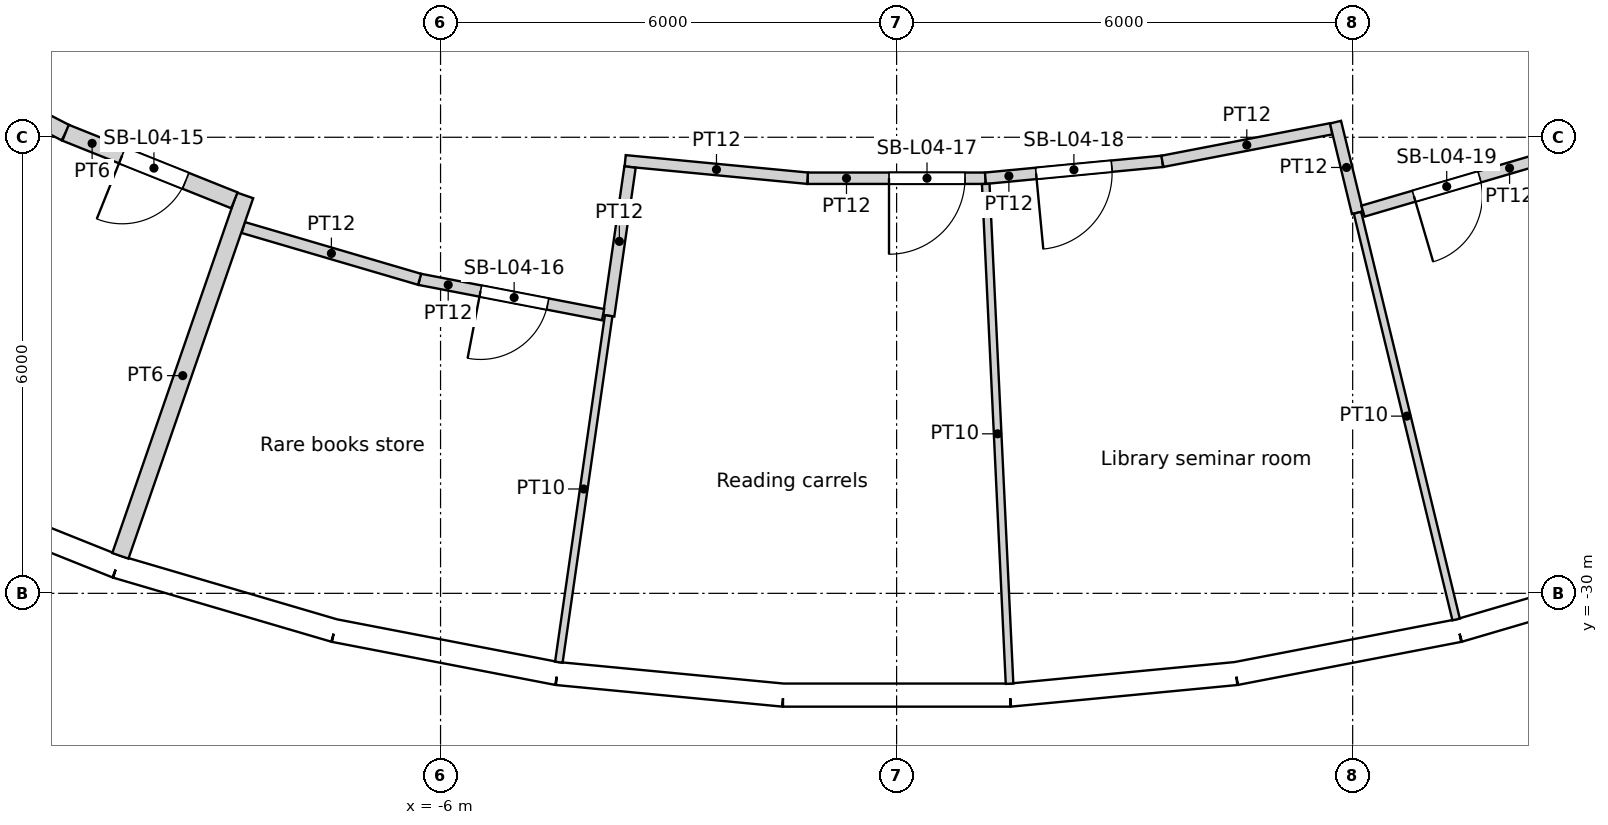
"""IFC4 building model, lengths in metres.
Left out: names, types, materials, properties, quantities, classifications, styles, units other than length and angle.
Written with IfcOpenShell. Run it as: python <this file> out.ifc"""

import sys

from ifc_helpers import new_model, si_unit, direction, frame, frame_2d, origin, origin_2d, place, context, subcontext, project, spatial, rectangle, circle, extrude, element, fill, save


model = new_model("IFC4")
c1 = context("Model", 3, precision=1e-05, world=origin(), true_north=direction((0.0, 1.0)))
c2 = subcontext(c1, "Body", "Model", "MODEL_VIEW")
j1 = project(units=[si_unit("LENGTHUNIT", "METRE"), si_unit("PLANEANGLEUNIT", "RADIAN")], contexts=[c1])
p1 = place(None, origin())
s1 = spatial("IfcSite", under=j1, at=p1, CompositionType="ELEMENT")
p2 = place(p1, origin())
s2 = spatial("IfcBuilding", under=s1, at=p2, CompositionType="ELEMENT")
p3 = place(p2, frame((0.0, 0.0, 23.4)))
s3 = spatial("IfcBuildingStorey", under=s2, at=p3, CompositionType="ELEMENT", Elevation=23.4)
for number, where, z_axis, x_axis in (
    (1, (-9.902, -28.61, 0.0), (0.0, 0.0, 1.0), (1.0, 0.0, 0.0)),
    (2, (-4.309, -29.966, 0.0), (0.0, 0.0, 1.0), (1.0, 0.0, 0.0)),
    (3, (1.44, -30.24, 0.0), (0.0, 0.0, 1.0), (1.0, 0.0, 0.0)),
    (4, (7.137, -29.421, 0.0), (0.0, 0.0, 1.0), (1.0, 0.0, 0.0)),
):
    element("IfcColumn", number, at=place(p3, frame(where, z_axis=z_axis, x_axis=x_axis)), inside=s3, PredefinedType="COLUMN", context=c2, shape_type="SweptSolid", body=[
        extrude(circle(Radius=0.7, at=origin_2d()), origin(), (0.0, 0.0, 1.0), 4.8),
    ])
for number, where, z_axis, x_axis in (
    (5, (-7.04, -23.516, 0.0), (0.0, 0.0, 1.0), (1.0, 0.0, 0.0)),
    (6, (-1.427, -24.506, 0.0), (0.0, 0.0, 1.0), (1.0, 0.0, 0.0)),
    (7, (4.263, -24.175, 0.0), (0.0, 0.0, 1.0), (1.0, 0.0, 0.0)),
):
    element("IfcColumn", number, at=place(p3, frame(where, z_axis=z_axis, x_axis=x_axis)), inside=s3, PredefinedType="COLUMN", context=c2, shape_type="SweptSolid", body=[
        extrude(circle(Radius=0.75, at=origin_2d()), origin(), (0.0, 0.0, 1.0), 4.8),
    ])
p4 = place(p3, frame((-13.033, -28.539, 0.0), z_axis=(0.0, 0.0, 1.0), x_axis=(0.928380795373, -0.371630325434, 0.0)))
e8 = element("IfcWall", 8, at=p4, inside=s3, PredefinedType="SOLIDWALL", context=c2, shape_type="SweptSolid", body=[
    extrude(rectangle(XDim=2.986, YDim=0.3, at=frame_2d((1.493, 0.0))), origin(), (0.0, 0.0, 1.0), 3.85),
])
p5 = place(p4, frame((1.493, 0.0, 2.0)))
e9 = element("IfcOpeningElement", 9, at=p5, cuts=e8, PredefinedType="OPENING", context=c2, shape_type="SweptSolid", body=[
    extrude(circle(Radius=1.2, at=origin_2d()), frame((0.0, 0.16, 0.0), z_axis=(0.0, -1.0, 0.0), x_axis=(1.0, 0.0, 0.0)), (0.0, 0.0, 1.0), 0.32),
])
p6 = place(p3, frame((-10.261, -29.649, 0.0), z_axis=(0.0, 0.0, 1.0), x_axis=(0.959502108153, -0.281701445593, 0.0)))
e10 = element("IfcWall", 10, at=p6, inside=s3, PredefinedType="SOLIDWALL", context=c2, shape_type="SweptSolid", body=[
    extrude(rectangle(XDim=2.986, YDim=0.3, at=frame_2d((1.493, 0.0))), origin(), (0.0, 0.0, 1.0), 4.35),
])
p7 = place(p6, frame((1.493, 0.0, 2.0)))
e11 = element("IfcOpeningElement", 11, at=p7, cuts=e10, PredefinedType="OPENING", context=c2, shape_type="SweptSolid", body=[
    extrude(circle(Radius=1.2, at=origin_2d()), frame((0.0, 0.16, 0.0), z_axis=(0.0, -1.0, 0.0), x_axis=(1.0, 0.0, 0.0)), (0.0, 0.0, 1.0), 0.32),
])
p8 = place(p3, frame((-7.397, -30.49, 0.0), z_axis=(0.0, 0.0, 1.0), x_axis=(0.981918853666, -0.189302310646, 0.0)))
e12 = element("IfcWall", 12, at=p8, inside=s3, PredefinedType="SOLIDWALL", context=c2, shape_type="SweptSolid", body=[
    extrude(rectangle(XDim=2.986, YDim=0.3, at=frame_2d((1.493, 0.0))), origin(), (0.0, 0.0, 1.0), 4.35),
])
p9 = place(p8, frame((1.493, 0.0, 2.0)))
e13 = element("IfcOpeningElement", 13, at=p9, cuts=e12, PredefinedType="OPENING", context=c2, shape_type="SweptSolid", body=[
    extrude(circle(Radius=1.2, at=origin_2d()), frame((0.0, 0.16, 0.0), z_axis=(0.0, -1.0, 0.0), x_axis=(1.0, 0.0, 0.0)), (0.0, 0.0, 1.0), 0.32),
])
p10 = place(p3, frame((-4.465, -31.055, 0.0), z_axis=(0.0, 0.0, 1.0), x_axis=(0.99547560533, -0.095017467833, 0.0)))
e14 = element("IfcWall", 14, at=p10, inside=s3, PredefinedType="SOLIDWALL", context=c2, shape_type="SweptSolid", body=[
    extrude(rectangle(XDim=2.986, YDim=0.3, at=frame_2d((1.493, 0.0))), origin(), (0.0, 0.0, 1.0), 3.85),
])
p11 = place(p10, frame((1.493, 0.0, 2.0)))
e15 = element("IfcOpeningElement", 15, at=p11, cuts=e14, PredefinedType="OPENING", context=c2, shape_type="SweptSolid", body=[
    extrude(circle(Radius=1.2, at=origin_2d()), frame((0.0, 0.16, 0.0), z_axis=(0.0, -1.0, 0.0), x_axis=(1.0, 0.0, 0.0)), (0.0, 0.0, 1.0), 0.32),
])
p12 = place(p3, frame((-1.493, -31.339, 0.0), z_axis=(0.0, 0.0, 1.0), x_axis=(1.0, 0.0, 0.0)))
e16 = element("IfcWall", 16, at=p12, inside=s3, PredefinedType="SOLIDWALL", context=c2, shape_type="SweptSolid", body=[
    extrude(rectangle(XDim=2.986, YDim=0.3, at=frame_2d((1.493, 0.0))), origin(), (0.0, 0.0, 1.0), 4.35),
])
p13 = place(p12, frame((1.493, 0.0, 2.0)))
e17 = element("IfcOpeningElement", 17, at=p13, cuts=e16, PredefinedType="OPENING", context=c2, shape_type="SweptSolid", body=[
    extrude(circle(Radius=1.2, at=origin_2d()), frame((0.0, 0.16, 0.0), z_axis=(0.0, -1.0, 0.0), x_axis=(1.0, 0.0, 0.0)), (0.0, 0.0, 1.0), 0.32),
])
p14 = place(p3, frame((1.493, -31.339, 0.0), z_axis=(0.0, 0.0, 1.0), x_axis=(0.99547560533, 0.095017467833, 0.0)))
e18 = element("IfcWall", 18, at=p14, inside=s3, PredefinedType="SOLIDWALL", context=c2, shape_type="SweptSolid", body=[
    extrude(rectangle(XDim=2.986, YDim=0.3, at=frame_2d((1.493, 0.0))), origin(), (0.0, 0.0, 1.0), 4.35),
])
p15 = place(p14, frame((1.493, 0.0, 2.0)))
e19 = element("IfcOpeningElement", 19, at=p15, cuts=e18, PredefinedType="OPENING", context=c2, shape_type="SweptSolid", body=[
    extrude(circle(Radius=1.2, at=origin_2d()), frame((0.0, 0.16, 0.0), z_axis=(0.0, -1.0, 0.0), x_axis=(1.0, 0.0, 0.0)), (0.0, 0.0, 1.0), 0.32),
])
p16 = place(p3, frame((4.465, -31.055, 0.0), z_axis=(0.0, 0.0, 1.0), x_axis=(0.981918853666, 0.189302310646, 0.0)))
e20 = element("IfcWall", 20, at=p16, inside=s3, PredefinedType="SOLIDWALL", context=c2, shape_type="SweptSolid", body=[
    extrude(rectangle(XDim=2.986, YDim=0.3, at=frame_2d((1.493, 0.0))), origin(), (0.0, 0.0, 1.0), 3.85),
])
p17 = place(p16, frame((1.493, 0.0, 2.0)))
e21 = element("IfcOpeningElement", 21, at=p17, cuts=e20, PredefinedType="OPENING", context=c2, shape_type="SweptSolid", body=[
    extrude(circle(Radius=1.2, at=origin_2d()), frame((0.0, 0.16, 0.0), z_axis=(0.0, -1.0, 0.0), x_axis=(1.0, 0.0, 0.0)), (0.0, 0.0, 1.0), 0.32),
])
p18 = place(p3, frame((7.397, -30.49, 0.0), z_axis=(0.0, 0.0, 1.0), x_axis=(0.959502108153, 0.281701445593, 0.0)))
e22 = element("IfcWall", 22, at=p18, inside=s3, PredefinedType="SOLIDWALL", context=c2, shape_type="SweptSolid", body=[
    extrude(rectangle(XDim=2.986, YDim=0.3, at=frame_2d((1.493, 0.0))), origin(), (0.0, 0.0, 1.0), 4.35),
])
p19 = place(p18, frame((1.493, 0.0, 2.0)))
e23 = element("IfcOpeningElement", 23, at=p19, cuts=e22, PredefinedType="OPENING", context=c2, shape_type="SweptSolid", body=[
    extrude(circle(Radius=1.2, at=origin_2d()), frame((0.0, 0.16, 0.0), z_axis=(0.0, -1.0, 0.0), x_axis=(1.0, 0.0, 0.0)), (0.0, 0.0, 1.0), 0.32),
])
p20 = place(p3, frame((-13.059, -22.844, 0.0), z_axis=(0.0, 0.0, 1.0), x_axis=(0.888868766166, -0.458161889002, 0.0)))
e24 = element("IfcWall", 24, at=p20, inside=s3, PredefinedType="PARTITIONING", context=c2, shape_type="SweptSolid", body=[
    extrude(rectangle(XDim=2.392, YDim=0.225, at=frame_2d((1.196, 0.0))), origin(), (0.0, 0.0, 1.0), 3.75),
])
p21 = place(p3, frame((-8.712, -24.829, 0.0), z_axis=(0.0, 0.0, 1.0), x_axis=(-0.928349940024, 0.37170739683, 0.0)))
e25 = element("IfcWall", 25, at=p21, inside=s3, PredefinedType="PARTITIONING", context=c2, shape_type="SweptSolid", body=[
    extrude(rectangle(XDim=2.392, YDim=0.225, at=frame_2d((1.196, 0.0))), origin(), (0.0, 0.0, 1.0), 3.75),
])
p22 = place(p21, frame((0.69, 0.0, 0.0)))
e26 = element("IfcOpeningElement", 26, at=p22, cuts=e25, PredefinedType="OPENING", context=c2, shape_type="SweptSolid", body=[
    extrude(rectangle(XDim=0.9, YDim=2.1, at=frame_2d((0.45, 1.05))), frame((0.0, 0.113, 0.0), z_axis=(0.0, -1.0, 0.0), x_axis=(1.0, 0.0, 0.0)), (0.0, 0.0, 1.0), 0.225),
])
p23 = place(p3, frame((-10.212, -29.507, 0.0), z_axis=(0.0, 0.0, 1.0), x_axis=(0.327037038986, 0.945011521163, 0.0)))
e27 = element("IfcWall", 27, at=p23, inside=s3, PredefinedType="PARTITIONING", context=c2, shape_type="SweptSolid", body=[
    extrude(rectangle(XDim=5.018, YDim=0.225, at=frame_2d((2.509, 0.0))), origin(), (0.0, 0.0, 1.0), 3.75),
])
p24 = place(p3, frame((-8.596, -25.187, 0.0), z_axis=(0.0, 0.0, 1.0), x_axis=(0.959498797191, -0.281712722802, 0.0)))
e28 = element("IfcWall", 28, at=p24, inside=s3, PredefinedType="PARTITIONING", context=c2, shape_type="SweptSolid", body=[
    extrude(rectangle(XDim=2.419, YDim=0.15, at=frame_2d((1.209, 0.0))), origin(), (0.0, 0.0, 1.0), 3.75),
])
p25 = place(p3, frame((-3.862, -26.334, 0.0), z_axis=(0.0, 0.0, 1.0), x_axis=(-0.981917073198, 0.189311545773, 0.0)))
e29 = element("IfcWall", 29, at=p25, inside=s3, PredefinedType="PARTITIONING", context=c2, shape_type="SweptSolid", body=[
    extrude(rectangle(XDim=2.458, YDim=0.15, at=frame_2d((1.229, 0.0))), origin(), (0.0, 0.0, 1.0), 3.75),
])
p26 = place(p25, frame((0.741, 0.0, 0.0)))
e30 = element("IfcOpeningElement", 30, at=p26, cuts=e29, PredefinedType="OPENING", context=c2, shape_type="SweptSolid", body=[
    extrude(rectangle(XDim=0.9, YDim=2.1, at=frame_2d((0.45, 1.05))), frame((0.0, 0.075, 0.0), z_axis=(0.0, -1.0, 0.0), x_axis=(1.0, 0.0, 0.0)), (0.0, 0.0, 1.0), 0.15),
])
p27 = place(p3, frame((-4.444, -30.906, 0.0), z_axis=(0.0, 0.0, 1.0), x_axis=(0.142289671733, 0.989825059957, 0.0)))
e31 = element("IfcWall", 31, at=p27, inside=s3, PredefinedType="PARTITIONING", context=c2, shape_type="SweptSolid", body=[
    extrude(rectangle(XDim=4.605, YDim=0.1, at=frame_2d((2.303, 0.0))), origin(), (0.0, 0.0, 1.0), 3.75),
])
p28 = place(p3, frame((-3.788, -26.348, 0.0), z_axis=(0.0, 0.0, 1.0), x_axis=(0.142354685764, 0.989815711858, 0.0)))
e32 = element("IfcWall", 32, at=p28, inside=s3, PredefinedType="PARTITIONING", context=c2, shape_type="SweptSolid", body=[
    extrude(rectangle(XDim=1.977, YDim=0.15, at=frame_2d((0.989, 0.0))), origin(), (0.0, 0.0, 1.0), 3.75),
])
p29 = place(p3, frame((-3.571, -24.31, 0.0), z_axis=(0.0, 0.0, 1.0), x_axis=(0.995475896214, -0.095014420263, 0.0)))
e33 = element("IfcWall", 33, at=p29, inside=s3, PredefinedType="PARTITIONING", context=c2, shape_type="SweptSolid", body=[
    extrude(rectangle(XDim=2.413, YDim=0.15, at=frame_2d((1.207, 0.0))), origin(), (0.0, 0.0, 1.0), 3.75),
])
p30 = place(p3, frame((1.169, -24.539, 0.0), z_axis=(0.0, 0.0, 1.0), x_axis=(-1.0, 0.0, 0.0)))
e34 = element("IfcWall", 34, at=p30, inside=s3, PredefinedType="PARTITIONING", context=c2, shape_type="SweptSolid", body=[
    extrude(rectangle(XDim=2.338, YDim=0.15, at=frame_2d((1.169, 0.0))), origin(), (0.0, 0.0, 1.0), 3.75),
])
p31 = place(p30, frame((0.269, 0.0, 0.0)))
e35 = element("IfcOpeningElement", 35, at=p31, cuts=e34, PredefinedType="OPENING", context=c2, shape_type="SweptSolid", body=[
    extrude(rectangle(XDim=1.0, YDim=2.1, at=frame_2d((0.5, 1.05))), frame((0.0, 0.075, 0.0), z_axis=(0.0, -1.0, 0.0), x_axis=(1.0, 0.0, 0.0)), (0.0, 0.0, 1.0), 0.15),
])
p32 = place(p3, frame((3.496, -24.317, 0.0), z_axis=(0.0, 0.0, 1.0), x_axis=(-0.995473855736, -0.095035796131, 0.0)))
e36 = element("IfcWall", 36, at=p32, inside=s3, PredefinedType="PARTITIONING", context=c2, shape_type="SweptSolid", body=[
    extrude(rectangle(XDim=2.338, YDim=0.15, at=frame_2d((1.169, 0.0))), origin(), (0.0, 0.0, 1.0), 3.75),
])
p33 = place(p32, frame((0.669, 0.0, 0.0)))
e37 = element("IfcOpeningElement", 37, at=p33, cuts=e36, PredefinedType="OPENING", context=c2, shape_type="SweptSolid", body=[
    extrude(rectangle(XDim=1.0, YDim=2.1, at=frame_2d((0.5, 1.05))), frame((0.0, 0.075, 0.0), z_axis=(0.0, -1.0, 0.0), x_axis=(1.0, 0.0, 0.0)), (0.0, 0.0, 1.0), 0.15),
])
p34 = place(p3, frame((1.486, -31.189, 0.0), z_axis=(0.0, 0.0, 1.0), x_axis=(-0.047549289688, 0.998868892823, 0.0)))
e38 = element("IfcWall", 38, at=p34, inside=s3, PredefinedType="PARTITIONING", context=c2, shape_type="SweptSolid", body=[
    extrude(rectangle(XDim=6.582, YDim=0.1, at=frame_2d((3.291, 0.0))), origin(), (0.0, 0.0, 1.0), 3.75),
])
p35 = place(p3, frame((3.496, -24.317, 0.0), z_axis=(0.0, 0.0, 1.0), x_axis=(0.981934043808, 0.18922350174, 0.0)))
e39 = element("IfcWall", 39, at=p35, inside=s3, PredefinedType="PARTITIONING", context=c2, shape_type="SweptSolid", body=[
    extrude(rectangle(XDim=2.263, YDim=0.15, at=frame_2d((1.131, 0.0))), origin(), (0.0, 0.0, 1.0), 3.75),
])
p36 = place(p3, frame((6.063, -24.993, 0.0), z_axis=(0.0, 0.0, 1.0), x_axis=(-0.235691182892, 0.97182800243, 0.0)))
e40 = element("IfcWall", 40, at=p36, inside=s3, PredefinedType="PARTITIONING", context=c2, shape_type="SweptSolid", body=[
    extrude(rectangle(XDim=1.227, YDim=0.15, at=frame_2d((0.613, 0.0))), origin(), (0.0, 0.0, 1.0), 3.75),
])
p37 = place(p3, frame((8.412, -24.304, 0.0), z_axis=(0.0, 0.0, 1.0), x_axis=(-0.959514485928, -0.281659282281, 0.0)))
e41 = element("IfcWall", 41, at=p37, inside=s3, PredefinedType="PARTITIONING", context=c2, shape_type="SweptSolid", body=[
    extrude(rectangle(XDim=2.372, YDim=0.15, at=frame_2d((1.186, 0.0))), origin(), (0.0, 0.0, 1.0), 3.75),
])
p38 = place(p37, frame((0.774, 0.0, 0.0)))
e42 = element("IfcOpeningElement", 42, at=p38, cuts=e41, PredefinedType="OPENING", context=c2, shape_type="SweptSolid", body=[
    extrude(rectangle(XDim=0.9, YDim=2.1, at=frame_2d((0.45, 1.05))), frame((0.0, 0.075, 0.0), z_axis=(0.0, -1.0, 0.0), x_axis=(1.0, 0.0, 0.0)), (0.0, 0.0, 1.0), 0.15),
])
p39 = place(p3, frame((7.361, -30.344, 0.0), z_axis=(0.0, 0.0, 1.0), x_axis=(-0.235758656248, 0.971811636072, 0.0)))
e43 = element("IfcWall", 43, at=p39, inside=s3, PredefinedType="PARTITIONING", context=c2, shape_type="SweptSolid", body=[
    extrude(rectangle(XDim=5.506, YDim=0.1, at=frame_2d((2.753, 0.0))), origin(), (0.0, 0.0, 1.0), 3.75),
])
p40 = place(p5, origin())
e44 = element("IfcWindow", 44, at=p40, inside=s3, PartitioningType="SINGLE_PANEL", PredefinedType="WINDOW", context=c2, shape_type="SweptSolid", body=[
    extrude(circle(Radius=1.2, at=origin_2d()), frame((0.0, 0.12, 0.0), z_axis=(0.0, -1.0, 0.0), x_axis=(1.0, 0.0, 0.0)), (0.0, 0.0, 1.0), 0.1),
])
fill(e9, e44)
p41 = place(p7, origin())
e45 = element("IfcWindow", 45, at=p41, inside=s3, PartitioningType="SINGLE_PANEL", PredefinedType="WINDOW", context=c2, shape_type="SweptSolid", body=[
    extrude(circle(Radius=1.2, at=origin_2d()), frame((0.0, 0.12, 0.0), z_axis=(0.0, -1.0, 0.0), x_axis=(1.0, 0.0, 0.0)), (0.0, 0.0, 1.0), 0.1),
])
fill(e11, e45)
p42 = place(p9, origin())
e46 = element("IfcWindow", 46, at=p42, inside=s3, PartitioningType="SINGLE_PANEL", PredefinedType="WINDOW", context=c2, shape_type="SweptSolid", body=[
    extrude(circle(Radius=1.2, at=origin_2d()), frame((0.0, 0.12, 0.0), z_axis=(0.0, -1.0, 0.0), x_axis=(1.0, 0.0, 0.0)), (0.0, 0.0, 1.0), 0.1),
])
fill(e13, e46)
p43 = place(p11, origin())
e47 = element("IfcWindow", 47, at=p43, inside=s3, PartitioningType="SINGLE_PANEL", PredefinedType="WINDOW", context=c2, shape_type="SweptSolid", body=[
    extrude(circle(Radius=1.2, at=origin_2d()), frame((0.0, 0.12, 0.0), z_axis=(0.0, -1.0, 0.0), x_axis=(1.0, 0.0, 0.0)), (0.0, 0.0, 1.0), 0.1),
])
fill(e15, e47)
p44 = place(p13, origin())
e48 = element("IfcWindow", 48, at=p44, inside=s3, PartitioningType="SINGLE_PANEL", PredefinedType="WINDOW", context=c2, shape_type="SweptSolid", body=[
    extrude(circle(Radius=1.2, at=origin_2d()), frame((0.0, 0.12, 0.0), z_axis=(0.0, -1.0, 0.0), x_axis=(1.0, 0.0, 0.0)), (0.0, 0.0, 1.0), 0.1),
])
fill(e17, e48)
p45 = place(p15, origin())
e49 = element("IfcWindow", 49, at=p45, inside=s3, PartitioningType="SINGLE_PANEL", PredefinedType="WINDOW", context=c2, shape_type="SweptSolid", body=[
    extrude(circle(Radius=1.2, at=origin_2d()), frame((0.0, 0.12, 0.0), z_axis=(0.0, -1.0, 0.0), x_axis=(1.0, 0.0, 0.0)), (0.0, 0.0, 1.0), 0.1),
])
fill(e19, e49)
p46 = place(p17, origin())
e50 = element("IfcWindow", 50, at=p46, inside=s3, PartitioningType="SINGLE_PANEL", PredefinedType="WINDOW", context=c2, shape_type="SweptSolid", body=[
    extrude(circle(Radius=1.2, at=origin_2d()), frame((0.0, 0.12, 0.0), z_axis=(0.0, -1.0, 0.0), x_axis=(1.0, 0.0, 0.0)), (0.0, 0.0, 1.0), 0.1),
])
fill(e21, e50)
p47 = place(p19, origin())
e51 = element("IfcWindow", 51, at=p47, inside=s3, PartitioningType="SINGLE_PANEL", PredefinedType="WINDOW", context=c2, shape_type="SweptSolid", body=[
    extrude(circle(Radius=1.2, at=origin_2d()), frame((0.0, 0.12, 0.0), z_axis=(0.0, -1.0, 0.0), x_axis=(1.0, 0.0, 0.0)), (0.0, 0.0, 1.0), 0.1),
])
fill(e23, e51)
p48 = place(p22, origin())
e52 = element("IfcDoor", 52, at=p48, inside=s3, OperationType="SINGLE_SWING_RIGHT", PredefinedType="DOOR", context=c2, shape_type="SweptSolid", body=[
    extrude(rectangle(XDim=0.9, YDim=2.1, at=frame_2d((0.45, 1.05))), frame((0.0, 0.025, 0.0), z_axis=(0.0, -1.0, 0.0), x_axis=(1.0, 0.0, 0.0)), (0.0, 0.0, 1.0), 0.05),
])
fill(e26, e52)
p49 = place(p26, origin())
e53 = element("IfcDoor", 53, at=p49, inside=s3, OperationType="SINGLE_SWING_RIGHT", PredefinedType="DOOR", context=c2, shape_type="SweptSolid", body=[
    extrude(rectangle(XDim=0.9, YDim=2.1, at=frame_2d((0.45, 1.05))), frame((0.0, 0.025, 0.0), z_axis=(0.0, -1.0, 0.0), x_axis=(1.0, 0.0, 0.0)), (0.0, 0.0, 1.0), 0.05),
])
fill(e30, e53)
p50 = place(p31, origin())
e54 = element("IfcDoor", 54, at=p50, inside=s3, OperationType="SINGLE_SWING_RIGHT", PredefinedType="DOOR", context=c2, shape_type="SweptSolid", body=[
    extrude(rectangle(XDim=1.0, YDim=2.1, at=frame_2d((0.5, 1.05))), frame((0.0, 0.025, 0.0), z_axis=(0.0, -1.0, 0.0), x_axis=(1.0, 0.0, 0.0)), (0.0, 0.0, 1.0), 0.05),
])
fill(e35, e54)
p51 = place(p33, origin())
e55 = element("IfcDoor", 55, at=p51, inside=s3, OperationType="SINGLE_SWING_RIGHT", PredefinedType="DOOR", context=c2, shape_type="SweptSolid", body=[
    extrude(rectangle(XDim=1.0, YDim=2.1, at=frame_2d((0.5, 1.05))), frame((0.0, 0.025, 0.0), z_axis=(0.0, -1.0, 0.0), x_axis=(1.0, 0.0, 0.0)), (0.0, 0.0, 1.0), 0.05),
])
fill(e37, e55)
p52 = place(p38, origin())
e56 = element("IfcDoor", 56, at=p52, inside=s3, OperationType="SINGLE_SWING_RIGHT", PredefinedType="DOOR", context=c2, shape_type="SweptSolid", body=[
    extrude(rectangle(XDim=0.9, YDim=2.1, at=frame_2d((0.45, 1.05))), frame((0.0, 0.025, 0.0), z_axis=(0.0, -1.0, 0.0), x_axis=(1.0, 0.0, 0.0)), (0.0, 0.0, 1.0), 0.05),
])
fill(e42, e56)
save(model, sys.argv[1])
